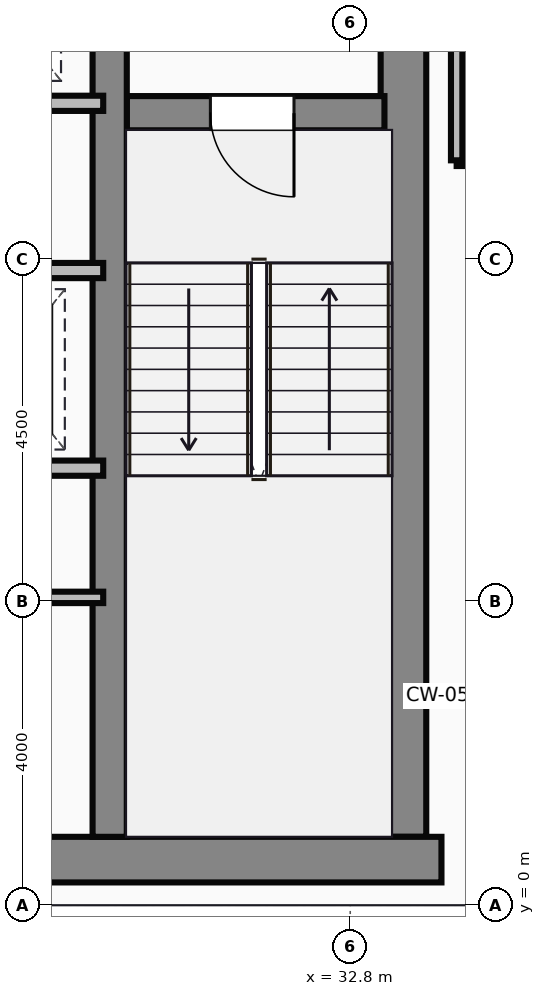
"""IFC4 building model, lengths in metres.
Left out: names, types, materials, properties, quantities, classifications, styles, units other than length and angle.
Written with IfcOpenShell. Run it as: python <this file> out.ifc"""

import sys

from ifc_helpers import new_model, si_unit, direction, frame, frame_2d, origin, place, context, subcontext, project, spatial, rectangle, extrude, source, transform, mapped, element, fill, save


model = new_model("IFC4")
c1 = context("Model", 3, precision=1e-05, world=origin(), true_north=direction((0.0, 1.0)))
c2 = subcontext(c1, "Body", "Model", "MODEL_VIEW")
j1 = project(units=[si_unit("LENGTHUNIT", "METRE"), si_unit("PLANEANGLEUNIT", "RADIAN")], contexts=[c1])
p1 = place(None, origin())
s1 = spatial("IfcSite", under=j1, at=p1, CompositionType="ELEMENT")
p2 = place(p1, origin())
s2 = spatial("IfcBuilding", under=s1, at=p2, CompositionType="ELEMENT")
p3 = place(p2, frame((0.0, 0.0, 273.4)))
s3 = spatial("IfcBuildingStorey", under=s2, at=p3, CompositionType="ELEMENT", Elevation=273.4)
m1 = source(origin(), c2, "Body", "SweptSolid", [
    extrude(rectangle(XDim=29.5, YDim=0.6, at=frame_2d((14.75, 0.0))), origin(), (0.0, 0.0, 1.0), 3.65),
])
p4 = place(p3, frame((4.5, 0.6, 0.0), z_axis=(0.0, 0.0, 1.0), x_axis=(1.0, 0.0, 0.0)))
e1 = element("IfcWall", 1, at=p4, inside=s3, PredefinedType="SHEAR", context=c2, shape_type="MappedRepresentation", body=[
    mapped(m1, transform((0.0, 0.0, 0.0))),
])
m2 = source(origin(), c2, "Body", "SweptSolid", [
    extrude(rectangle(XDim=13.1, YDim=0.6, at=frame_2d((6.55, 0.0))), origin(), (0.0, 0.0, 1.0), 3.65),
])
p5 = place(p3, frame((33.5, 0.9, 0.0), z_axis=(0.0, 0.0, 1.0), x_axis=(0.0, 1.0, 0.0)))
e2 = element("IfcWall", 2, at=p5, inside=s3, PredefinedType="SHEAR", context=c2, shape_type="MappedRepresentation", body=[
    mapped(m2, transform((0.0, 0.0, 0.0))),
])
m3 = source(origin(), c2, "Body", "SweptSolid", [
    extrude(rectangle(XDim=12.5, YDim=0.45, at=frame_2d((6.25, 0.0))), origin(), (0.0, 0.0, 1.0), 3.65),
])
p6 = place(p3, frame((29.635, 0.9, 0.0), z_axis=(0.0, 0.0, 1.0), x_axis=(0.0, 1.0, 0.0)))
e3 = element("IfcWall", 3, at=p6, inside=s3, PredefinedType="SHEAR", context=c2, shape_type="MappedRepresentation", body=[
    mapped(m3, transform((0.0, 0.0, 0.0))),
])
m4 = source(origin(), c2, "Body", "SweptSolid", [
    extrude(rectangle(XDim=3.39, YDim=0.45, at=frame_2d((1.695, 0.0))), origin(), (0.0, 0.0, 1.0), 3.65),
])
p7 = place(p3, frame((29.86, 10.42, 0.0), z_axis=(0.0, 0.0, 1.0), x_axis=(1.0, 0.0, 0.0)))
e4 = element("IfcWall", 4, at=p7, inside=s3, PredefinedType="SHEAR", context=c2, shape_type="MappedRepresentation", body=[
    mapped(m4, transform((0.0, 0.0, 0.0))),
])
p8 = place(p7, frame((1.1, 0.0, 0.0)))
e5 = element("IfcOpeningElement", 5, at=p8, cuts=e4, PredefinedType="OPENING", context=c2, shape_type="SweptSolid", body=[
    extrude(rectangle(XDim=1.1, YDim=2.15, at=frame_2d((0.55, 1.075))), frame((0.0, 0.235, 0.0), z_axis=(0.0, -1.0, 0.0), x_axis=(1.0, 0.0, 0.0)), (0.0, 0.0, 1.0), 0.47),
])
m5 = source(origin(), c2, "Body", "SweptSolid", [
    extrude(rectangle(XDim=8.8, YDim=0.2, at=frame_2d((4.4, 0.0))), origin(), (0.0, 0.0, 1.0), 3.4),
])
p9 = place(p3, frame((20.75, 10.55, 0.0), z_axis=(0.0, 0.0, 1.0), x_axis=(1.0, 0.0, 0.0)))
e6 = element("IfcWall", 6, at=p9, inside=s3, PredefinedType="PARTITIONING", context=c2, shape_type="MappedRepresentation", body=[
    mapped(m5, transform((0.0, 0.0, 0.0))),
])
p10 = place(p9, frame((0.5, 0.0, 0.0)))
e7 = element("IfcOpeningElement", 7, at=p10, cuts=e6, PredefinedType="OPENING", context=c2, shape_type="SweptSolid", body=[
    extrude(rectangle(XDim=1.05, YDim=2.15, at=frame_2d((0.525, 1.075))), frame((0.0, 0.11, 0.0), z_axis=(0.0, -1.0, 0.0), x_axis=(1.0, 0.0, 0.0)), (0.0, 0.0, 1.0), 0.22),
])
p11 = place(p9, frame((2.6, 0.0, 0.0)))
e8 = element("IfcOpeningElement", 8, at=p11, cuts=e6, PredefinedType="OPENING", context=c2, shape_type="SweptSolid", body=[
    extrude(rectangle(XDim=1.05, YDim=2.15, at=frame_2d((0.525, 1.075))), frame((0.0, 0.11, 0.0), z_axis=(0.0, -1.0, 0.0), x_axis=(1.0, 0.0, 0.0)), (0.0, 0.0, 1.0), 0.22),
])
p12 = place(p9, frame((4.7, 0.0, 0.0)))
e9 = element("IfcOpeningElement", 9, at=p12, cuts=e6, PredefinedType="OPENING", context=c2, shape_type="SweptSolid", body=[
    extrude(rectangle(XDim=1.05, YDim=2.15, at=frame_2d((0.525, 1.075))), frame((0.0, 0.11, 0.0), z_axis=(0.0, -1.0, 0.0), x_axis=(1.0, 0.0, 0.0)), (0.0, 0.0, 1.0), 0.22),
])
p13 = place(p9, frame((6.8, 0.0, 0.0)))
e10 = element("IfcOpeningElement", 10, at=p13, cuts=e6, PredefinedType="OPENING", context=c2, shape_type="SweptSolid", body=[
    extrude(rectangle(XDim=1.05, YDim=2.15, at=frame_2d((0.525, 1.075))), frame((0.0, 0.11, 0.0), z_axis=(0.0, -1.0, 0.0), x_axis=(1.0, 0.0, 0.0)), (0.0, 0.0, 1.0), 0.22),
])
m6 = source(origin(), c2, "Body", "SweptSolid", [
    extrude(rectangle(XDim=4.55, YDim=0.2, at=frame_2d((2.275, 0.0))), origin(), (0.0, 0.0, 1.0), 3.4),
])
p14 = place(p3, frame((25.0, 8.35, 0.0), z_axis=(0.0, 0.0, 1.0), x_axis=(1.0, 0.0, 0.0)))
e11 = element("IfcWall", 11, at=p14, inside=s3, PredefinedType="PARTITIONING", context=c2, shape_type="MappedRepresentation", body=[
    mapped(m6, transform((0.0, 0.0, 0.0))),
])
p15 = place(p14, frame((0.5, 0.0, 0.0)))
e12 = element("IfcOpeningElement", 12, at=p15, cuts=e11, PredefinedType="OPENING", context=c2, shape_type="SweptSolid", body=[
    extrude(rectangle(XDim=1.05, YDim=2.15, at=frame_2d((0.525, 1.075))), frame((0.0, 0.11, 0.0), z_axis=(0.0, -1.0, 0.0), x_axis=(1.0, 0.0, 0.0)), (0.0, 0.0, 1.0), 0.22),
])
p16 = place(p14, frame((2.6, 0.0, 0.0)))
e13 = element("IfcOpeningElement", 13, at=p16, cuts=e11, PredefinedType="OPENING", context=c2, shape_type="SweptSolid", body=[
    extrude(rectangle(XDim=1.05, YDim=2.15, at=frame_2d((0.525, 1.075))), frame((0.0, 0.11, 0.0), z_axis=(0.0, -1.0, 0.0), x_axis=(1.0, 0.0, 0.0)), (0.0, 0.0, 1.0), 0.22),
])
p17 = place(p3, frame((25.0, 5.75, 0.0), z_axis=(0.0, 0.0, 1.0), x_axis=(1.0, 0.0, 0.0)))
e14 = element("IfcWall", 14, at=p17, inside=s3, PredefinedType="PARTITIONING", context=c2, shape_type="MappedRepresentation", body=[
    mapped(m6, transform((0.0, 0.0, 0.0))),
])
m7 = source(origin(), c2, "Body", "SweptSolid", [
    extrude(rectangle(XDim=4.55, YDim=0.15, at=frame_2d((2.275, 0.0))), origin(), (0.0, 0.0, 1.0), 3.4),
])
p18 = place(p3, frame((25.0, 4.05, 0.0), z_axis=(0.0, 0.0, 1.0), x_axis=(1.0, 0.0, 0.0)))
e15 = element("IfcWall", 15, at=p18, inside=s3, PredefinedType="PARTITIONING", context=c2, shape_type="MappedRepresentation", body=[
    mapped(m7, transform((0.0, 0.0, 0.0))),
])
m8 = source(origin(), c2, "Body", "SweptSolid", [
    extrude(rectangle(XDim=4.8, YDim=0.15, at=frame_2d((2.4, 0.0))), origin(), (0.0, 0.0, 1.0), 3.4),
])
p19 = place(p3, frame((34.2, 9.8, 0.0), z_axis=(0.0, 0.0, 1.0), x_axis=(1.0, 0.0, 0.0)))
e16 = element("IfcWall", 16, at=p19, inside=s3, PredefinedType="PARTITIONING", context=c2, shape_type="MappedRepresentation", body=[
    mapped(m8, transform((0.0, 0.0, 0.0))),
])
m9 = source(origin(), c2, "Body", "SweptSolid", [
    extrude(rectangle(XDim=4.18, YDim=0.15, at=frame_2d((2.09, 0.0))), origin(), (0.0, 0.0, 1.0), 3.4),
])
p20 = place(p3, frame((34.2, 9.8, 0.0), z_axis=(0.0, 0.0, 1.0), x_axis=(0.0, 1.0, 0.0)))
e17 = element("IfcWall", 17, at=p20, inside=s3, PredefinedType="PARTITIONING", context=c2, shape_type="MappedRepresentation", body=[
    mapped(m9, transform((0.0, 0.0, 0.0))),
])
m10 = source(origin(), c2, "Body", "SweptSolid", [
    extrude(rectangle(XDim=1.1, YDim=2.15, at=frame_2d((0.55, 1.075))), frame((0.0, 0.025, 0.0), z_axis=(0.0, -1.0, 0.0), x_axis=(1.0, 0.0, 0.0)), (0.0, 0.0, 1.0), 0.05),
])
p21 = place(p8, frame((1.1, 0.0, 0.0), z_axis=(0.0, 0.0, 1.0), x_axis=(-1.0, 0.0, 0.0)))
e18 = element("IfcDoor", 18, at=p21, inside=s3, OperationType="SINGLE_SWING_RIGHT", PredefinedType="DOOR", context=c2, shape_type="MappedRepresentation", body=[
    mapped(m10, transform((0.0, 0.0, 0.0))),
])
fill(e5, e18)
save(model, sys.argv[1])
